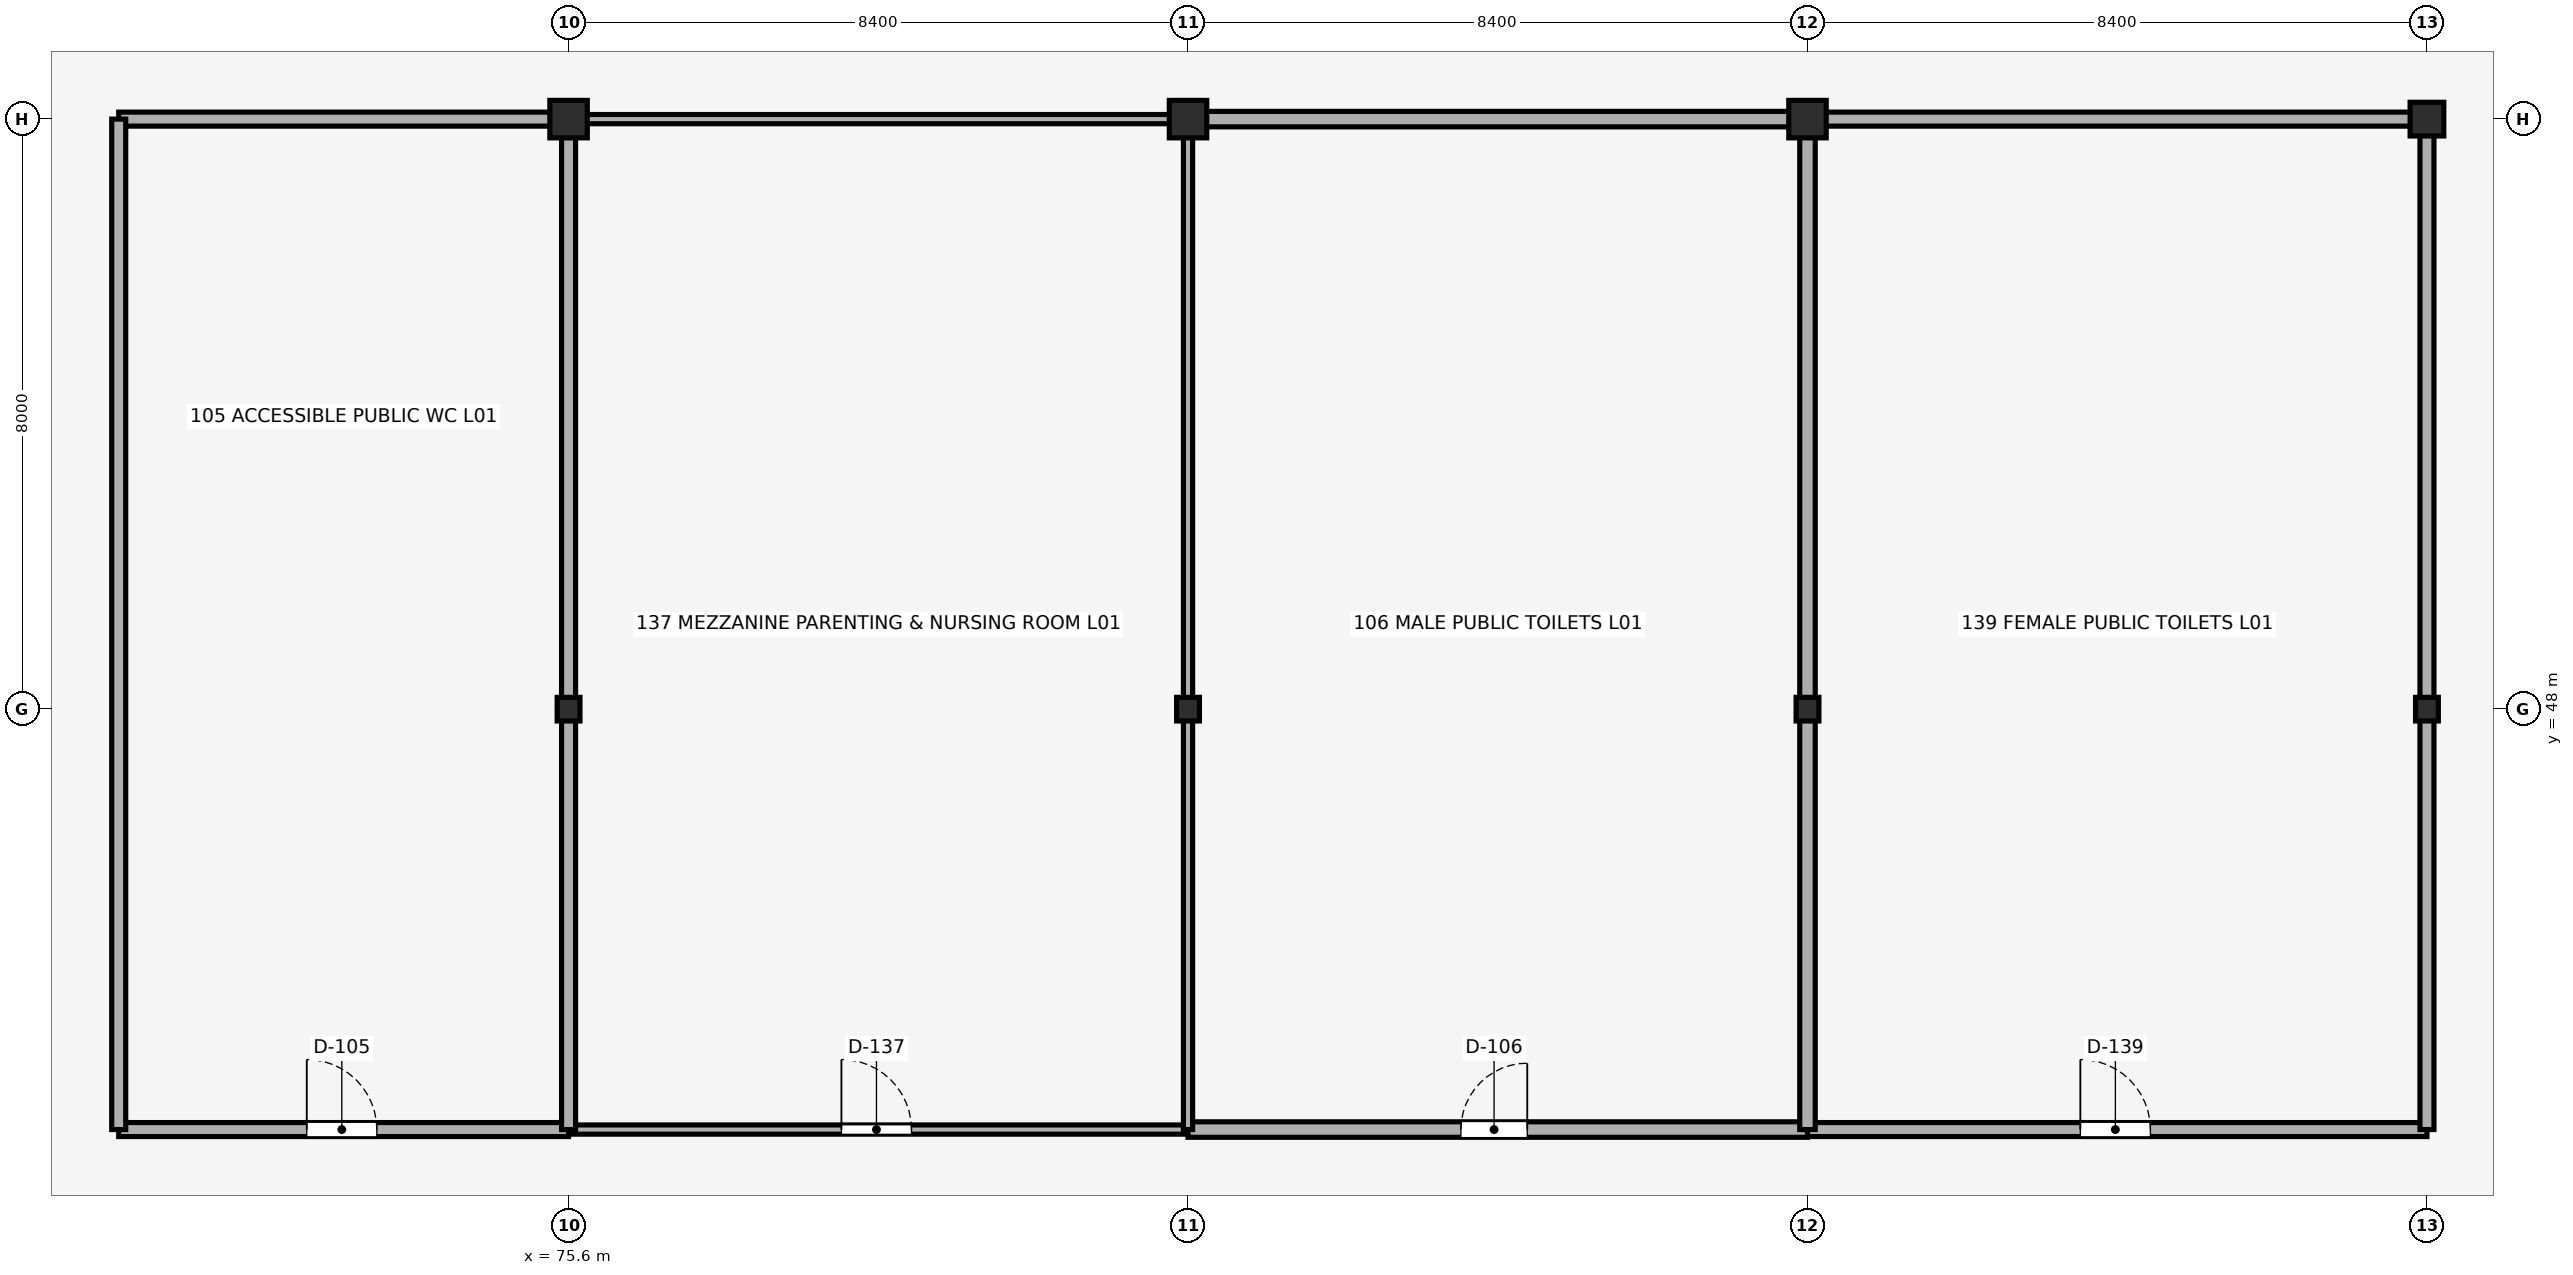
"""IFC4 building model, lengths in metres.
Left out: names, types, materials, properties, quantities, classifications, styles, units other than length and angle.
Written with IfcOpenShell. Run it as: python <this file> out.ifc"""

import sys

from ifc_helpers import new_model, si_unit, direction, frame, frame_2d, origin, origin_2d, place, context, subcontext, project, spatial, rectangle, hollow_circle, i_section, extrude, element, fill, save


model = new_model("IFC4")
c1 = context("Model", 3, precision=1e-05, world=origin(), true_north=direction((0.0, 1.0)))
c2 = subcontext(c1, "Body", "Model", "MODEL_VIEW")
j1 = project(units=[si_unit("LENGTHUNIT", "METRE"), si_unit("PLANEANGLEUNIT", "RADIAN")], contexts=[c1])
p1 = place(None, origin())
s1 = spatial("IfcSite", under=j1, at=p1, CompositionType="ELEMENT")
p2 = place(p1, origin())
s2 = spatial("IfcBuilding", under=s1, at=p2, CompositionType="ELEMENT")
p3 = place(p2, frame((0.0, 0.0, 5.44)))
s3 = spatial("IfcBuildingStorey", under=s2, at=p3, CompositionType="ELEMENT", Elevation=5.44)
p4 = place(p3, frame((75.6, 48.0, 0.0), z_axis=(0.0, 0.0, 1.0), x_axis=(1.0, 0.0, 0.0)))
e1 = element("IfcColumn", 1, at=p4, inside=s3, PredefinedType="COLUMN", context=c2, shape_type="SweptSolid", body=[
    extrude(i_section(OverallWidth=0.309, OverallDepth=0.321, WebThickness=0.014, FlangeThickness=0.022, FilletRadius=0.015, at=origin_2d()), origin(), (0.0, 0.0, 1.0), 3.8),
])
p5 = place(p3, frame((75.6, 56.0, 0.0), z_axis=(0.0, 0.0, 1.0), x_axis=(1.0, 0.0, 0.0)))
e2 = element("IfcColumn", 2, at=p5, inside=s3, PredefinedType="COLUMN", context=c2, shape_type="SweptSolid", body=[
    extrude(hollow_circle(Radius=0.229, WallThickness=0.016, at=origin_2d()), origin(), (0.0, 0.0, 1.0), 11.288),
])
p6 = place(p3, frame((84.0, 48.0, 0.0), z_axis=(0.0, 0.0, 1.0), x_axis=(1.0, 0.0, 0.0)))
e3 = element("IfcColumn", 3, at=p6, inside=s3, PredefinedType="COLUMN", context=c2, shape_type="SweptSolid", body=[
    extrude(i_section(OverallWidth=0.309, OverallDepth=0.321, WebThickness=0.014, FlangeThickness=0.022, FilletRadius=0.015, at=origin_2d()), origin(), (0.0, 0.0, 1.0), 3.8),
])
p7 = place(p3, frame((84.0, 56.0, 0.0), z_axis=(0.0, 0.0, 1.0), x_axis=(1.0, 0.0, 0.0)))
e4 = element("IfcColumn", 4, at=p7, inside=s3, PredefinedType="COLUMN", context=c2, shape_type="SweptSolid", body=[
    extrude(hollow_circle(Radius=0.229, WallThickness=0.016, at=origin_2d()), origin(), (0.0, 0.0, 1.0), 11.288),
])
p8 = place(p3, frame((92.4, 48.0, 0.0), z_axis=(0.0, 0.0, 1.0), x_axis=(1.0, 0.0, 0.0)))
e5 = element("IfcColumn", 5, at=p8, inside=s3, PredefinedType="COLUMN", context=c2, shape_type="SweptSolid", body=[
    extrude(i_section(OverallWidth=0.309, OverallDepth=0.321, WebThickness=0.014, FlangeThickness=0.022, FilletRadius=0.015, at=origin_2d()), origin(), (0.0, 0.0, 1.0), 3.8),
])
p9 = place(p3, frame((92.4, 56.0, 0.0), z_axis=(0.0, 0.0, 1.0), x_axis=(1.0, 0.0, 0.0)))
e6 = element("IfcColumn", 6, at=p9, inside=s3, PredefinedType="COLUMN", context=c2, shape_type="SweptSolid", body=[
    extrude(hollow_circle(Radius=0.229, WallThickness=0.016, at=origin_2d()), origin(), (0.0, 0.0, 1.0), 12.952),
])
p10 = place(p3, frame((100.8, 48.0, 0.0), z_axis=(0.0, 0.0, 1.0), x_axis=(1.0, 0.0, 0.0)))
e7 = element("IfcColumn", 7, at=p10, inside=s3, PredefinedType="COLUMN", context=c2, shape_type="SweptSolid", body=[
    extrude(i_section(OverallWidth=0.309, OverallDepth=0.321, WebThickness=0.014, FlangeThickness=0.022, FilletRadius=0.015, at=origin_2d()), origin(), (0.0, 0.0, 1.0), 3.8),
])
p11 = place(p3, frame((100.8, 56.0, 0.0), z_axis=(0.0, 0.0, 1.0), x_axis=(1.0, 0.0, 0.0)))
e8 = element("IfcColumn", 8, at=p11, inside=s3, PredefinedType="COLUMN", context=c2, shape_type="SweptSolid", body=[
    extrude(hollow_circle(Radius=0.229, WallThickness=0.016, at=origin_2d()), origin(), (0.0, 0.0, 1.0), 16.31),
])
for number, where, z_axis, x_axis in (
    (9, (75.6, 56.0, 11.338), (0.0, -0.105, 0.994), (1.0, 0.0, 0.0)),
    (10, (84.0, 56.0, 11.338), (0.0, -0.105, 0.994), (1.0, 0.0, 0.0)),
):
    element("IfcColumn", number, at=place(p3, frame(where, z_axis=z_axis, x_axis=x_axis)), inside=s3, PredefinedType="COLUMN", context=c2, shape_type="SweptSolid", body=[
        extrude(hollow_circle(Radius=0.254, WallThickness=0.02, at=origin_2d()), origin(), (0.0, 0.0, 1.0), 2.846),
    ])
p12 = place(p3, frame((92.4, 56.0, 13.002), z_axis=(0.0, -0.105430502232, 0.994426673616), x_axis=(1.0, 0.0, 0.0)))
e11 = element("IfcColumn", 11, at=p12, inside=s3, PredefinedType="COLUMN", context=c2, shape_type="SweptSolid", body=[
    extrude(hollow_circle(Radius=0.254, WallThickness=0.02, at=origin_2d()), origin(), (0.0, 0.0, 1.0), 2.846),
])
p13 = place(p3, frame((69.5, 42.3, 0.0), z_axis=(0.0, 0.0, 1.0), x_axis=(1.0, 0.0, 0.0)))
e12 = element("IfcWall", 12, at=p13, inside=s3, PredefinedType="PLUMBINGWALL", context=c2, shape_type="SweptSolid", body=[
    extrude(rectangle(XDim=6.1, YDim=0.19, at=frame_2d((3.05, 0.0))), origin(), (0.0, 0.0, 1.0), 3.8),
])
p14 = place(p13, frame((2.55, 0.0, 0.0), z_axis=(0.0, 0.0, 1.0), x_axis=(1.0, 0.0, 0.0)))
e13 = element("IfcOpeningElement", 13, at=p14, cuts=e12, PredefinedType="OPENING", context=c2, shape_type="SweptSolid", body=[
    extrude(rectangle(XDim=0.95, YDim=2.15, at=frame_2d((0.475, 1.075))), frame((0.0, 0.105, 0.0), z_axis=(0.0, -1.0, 0.0), x_axis=(1.0, 0.0, 0.0)), (0.0, 0.0, 1.0), 0.21),
])
p15 = place(p3, frame((75.6, 42.3, 0.0), z_axis=(0.0, 0.0, 1.0), x_axis=(1.0, 0.0, 0.0)))
e14 = element("IfcWall", 14, at=p15, inside=s3, PredefinedType="PARTITIONING", context=c2, shape_type="SweptSolid", body=[
    extrude(rectangle(XDim=8.4, YDim=0.125, at=frame_2d((4.2, 0.0))), origin(), (0.0, 0.0, 1.0), 3.8),
])
p16 = place(p15, frame((3.7, 0.0, 0.0), z_axis=(0.0, 0.0, 1.0), x_axis=(1.0, 0.0, 0.0)))
e15 = element("IfcOpeningElement", 15, at=p16, cuts=e14, PredefinedType="OPENING", context=c2, shape_type="SweptSolid", body=[
    extrude(rectangle(XDim=0.95, YDim=2.15, at=frame_2d((0.475, 1.075))), frame((0.0, 0.073, 0.0), z_axis=(0.0, -1.0, 0.0), x_axis=(1.0, 0.0, 0.0)), (0.0, 0.0, 1.0), 0.145),
])
p17 = place(p3, frame((84.0, 42.3, 0.0), z_axis=(0.0, 0.0, 1.0), x_axis=(1.0, 0.0, 0.0)))
e16 = element("IfcWall", 16, at=p17, inside=s3, PredefinedType="PLUMBINGWALL", context=c2, shape_type="SweptSolid", body=[
    extrude(rectangle(XDim=8.4, YDim=0.21, at=frame_2d((4.2, 0.0))), origin(), (0.0, 0.0, 1.0), 3.8),
])
p18 = place(p17, frame((3.7, 0.0, 0.0), z_axis=(0.0, 0.0, 1.0), x_axis=(1.0, 0.0, 0.0)))
e17 = element("IfcOpeningElement", 17, at=p18, cuts=e16, PredefinedType="OPENING", context=c2, shape_type="SweptSolid", body=[
    extrude(rectangle(XDim=0.9, YDim=2.15, at=frame_2d((0.45, 1.075))), frame((0.0, 0.115, 0.0), z_axis=(0.0, -1.0, 0.0), x_axis=(1.0, 0.0, 0.0)), (0.0, 0.0, 1.0), 0.23),
])
p19 = place(p3, frame((92.4, 42.3, 0.0), z_axis=(0.0, 0.0, 1.0), x_axis=(1.0, 0.0, 0.0)))
e18 = element("IfcWall", 18, at=p19, inside=s3, PredefinedType="PLUMBINGWALL", context=c2, shape_type="SweptSolid", body=[
    extrude(rectangle(XDim=8.4, YDim=0.19, at=frame_2d((4.2, 0.0))), origin(), (0.0, 0.0, 1.0), 3.8),
])
p20 = place(p19, frame((3.7, 0.0, 0.0), z_axis=(0.0, 0.0, 1.0), x_axis=(1.0, 0.0, 0.0)))
e19 = element("IfcOpeningElement", 19, at=p20, cuts=e18, PredefinedType="OPENING", context=c2, shape_type="SweptSolid", body=[
    extrude(rectangle(XDim=0.95, YDim=2.15, at=frame_2d((0.475, 1.075))), frame((0.0, 0.105, 0.0), z_axis=(0.0, -1.0, 0.0), x_axis=(1.0, 0.0, 0.0)), (0.0, 0.0, 1.0), 0.21),
])
p21 = place(p3, frame((69.5, 56.0, 0.0), z_axis=(0.0, 0.0, 1.0), x_axis=(1.0, 0.0, 0.0)))
e20 = element("IfcWall", 20, at=p21, inside=s3, PredefinedType="PLUMBINGWALL", context=c2, shape_type="SweptSolid", body=[
    extrude(rectangle(XDim=5.882, YDim=0.19, at=frame_2d((2.941, 0.0))), origin(), (0.0, 0.0, 1.0), 3.8),
])
p22 = place(p3, frame((69.5, 42.3, 0.0), z_axis=(0.0, 0.0, 1.0), x_axis=(0.0, 1.0, 0.0)))
e21 = element("IfcWall", 21, at=p22, inside=s3, PredefinedType="PLUMBINGWALL", context=c2, shape_type="SweptSolid", body=[
    extrude(rectangle(XDim=13.7, YDim=0.19, at=frame_2d((6.85, 0.0))), origin(), (0.0, 0.0, 1.0), 3.8),
])
p23 = place(p3, frame((75.6, 42.3, 0.0), z_axis=(0.0, 0.0, 1.0), x_axis=(0.0, 1.0, 0.0)))
e22 = element("IfcWall", 22, at=p23, inside=s3, PredefinedType="PLUMBINGWALL", context=c2, shape_type="SweptSolid", body=[
    extrude(rectangle(XDim=5.55, YDim=0.19, at=frame_2d((2.775, 0.0))), origin(), (0.0, 0.0, 1.0), 3.337),
])
p24 = place(p3, frame((75.6, 48.15, 0.0), z_axis=(0.0, 0.0, 1.0), x_axis=(0.0, 1.0, 0.0)))
e23 = element("IfcWall", 23, at=p24, inside=s3, PredefinedType="PLUMBINGWALL", context=c2, shape_type="SweptSolid", body=[
    extrude(rectangle(XDim=7.631, YDim=0.19, at=frame_2d((3.815, 0.0))), origin(), (0.0, 0.0, 1.0), 3.337),
])
p25 = place(p3, frame((75.819, 56.0, 0.0), z_axis=(0.0, 0.0, 1.0), x_axis=(1.0, 0.0, 0.0)))
e24 = element("IfcWall", 24, at=p25, inside=s3, PredefinedType="PARTITIONING", context=c2, shape_type="SweptSolid", body=[
    extrude(rectangle(XDim=7.963, YDim=0.125, at=frame_2d((3.981, 0.0))), origin(), (0.0, 0.0, 1.0), 3.8),
])
p26 = place(p3, frame((84.0, 42.3, 0.0), z_axis=(0.0, 0.0, 1.0), x_axis=(0.0, 1.0, 0.0)))
e25 = element("IfcWall", 25, at=p26, inside=s3, PredefinedType="PARTITIONING", context=c2, shape_type="SweptSolid", body=[
    extrude(rectangle(XDim=5.55, YDim=0.125, at=frame_2d((2.775, 0.0))), origin(), (0.0, 0.0, 1.0), 3.337),
])
p27 = place(p3, frame((84.0, 48.15, 0.0), z_axis=(0.0, 0.0, 1.0), x_axis=(0.0, 1.0, 0.0)))
e26 = element("IfcWall", 26, at=p27, inside=s3, PredefinedType="PARTITIONING", context=c2, shape_type="SweptSolid", body=[
    extrude(rectangle(XDim=7.631, YDim=0.125, at=frame_2d((3.815, 0.0))), origin(), (0.0, 0.0, 1.0), 3.337),
])
p28 = place(p3, frame((84.219, 56.0, 0.0), z_axis=(0.0, 0.0, 1.0), x_axis=(1.0, 0.0, 0.0)))
e27 = element("IfcWall", 27, at=p28, inside=s3, PredefinedType="PLUMBINGWALL", context=c2, shape_type="SweptSolid", body=[
    extrude(rectangle(XDim=7.963, YDim=0.21, at=frame_2d((3.981, 0.0))), origin(), (0.0, 0.0, 1.0), 3.8),
])
p29 = place(p3, frame((92.4, 42.3, 0.0), z_axis=(0.0, 0.0, 1.0), x_axis=(0.0, 1.0, 0.0)))
e28 = element("IfcWall", 28, at=p29, inside=s3, PredefinedType="PLUMBINGWALL", context=c2, shape_type="SweptSolid", body=[
    extrude(rectangle(XDim=5.55, YDim=0.21, at=frame_2d((2.775, 0.0))), origin(), (0.0, 0.0, 1.0), 3.337),
])
p30 = place(p3, frame((92.4, 48.15, 0.0), z_axis=(0.0, 0.0, 1.0), x_axis=(0.0, 1.0, 0.0)))
e29 = element("IfcWall", 29, at=p30, inside=s3, PredefinedType="PLUMBINGWALL", context=c2, shape_type="SweptSolid", body=[
    extrude(rectangle(XDim=7.631, YDim=0.21, at=frame_2d((3.815, 0.0))), origin(), (0.0, 0.0, 1.0), 3.337),
])
p31 = place(p3, frame((92.618, 56.0, 0.0), z_axis=(0.0, 0.0, 1.0), x_axis=(1.0, 0.0, 0.0)))
e30 = element("IfcWall", 30, at=p31, inside=s3, PredefinedType="PLUMBINGWALL", context=c2, shape_type="SweptSolid", body=[
    extrude(rectangle(XDim=7.963, YDim=0.19, at=frame_2d((3.981, 0.0))), origin(), (0.0, 0.0, 1.0), 3.8),
])
p32 = place(p3, frame((100.8, 42.3, 0.0), z_axis=(0.0, 0.0, 1.0), x_axis=(0.0, 1.0, 0.0)))
e31 = element("IfcWall", 31, at=p32, inside=s3, PredefinedType="PLUMBINGWALL", context=c2, shape_type="SweptSolid", body=[
    extrude(rectangle(XDim=5.55, YDim=0.19, at=frame_2d((2.775, 0.0))), origin(), (0.0, 0.0, 1.0), 3.337),
])
p33 = place(p3, frame((100.8, 48.15, 0.0), z_axis=(0.0, 0.0, 1.0), x_axis=(0.0, 1.0, 0.0)))
e32 = element("IfcWall", 32, at=p33, inside=s3, PredefinedType="PLUMBINGWALL", context=c2, shape_type="SweptSolid", body=[
    extrude(rectangle(XDim=7.631, YDim=0.19, at=frame_2d((3.815, 0.0))), origin(), (0.0, 0.0, 1.0), 3.337),
])
p34 = place(p14, origin())
e33 = element("IfcDoor", 33, at=p34, inside=s3, OperationType="SINGLE_SWING_LEFT", PredefinedType="DOOR", context=c2, shape_type="SweptSolid", body=[
    extrude(rectangle(XDim=0.95, YDim=2.15, at=frame_2d((0.475, 1.075))), frame((0.0, 0.025, 0.0), z_axis=(0.0, -1.0, 0.0), x_axis=(1.0, 0.0, 0.0)), (0.0, 0.0, 1.0), 0.05),
])
fill(e13, e33)
p35 = place(p16, origin())
e34 = element("IfcDoor", 34, at=p35, inside=s3, OperationType="SINGLE_SWING_LEFT", PredefinedType="DOOR", context=c2, shape_type="SweptSolid", body=[
    extrude(rectangle(XDim=0.95, YDim=2.15, at=frame_2d((0.475, 1.075))), frame((0.0, 0.025, 0.0), z_axis=(0.0, -1.0, 0.0), x_axis=(1.0, 0.0, 0.0)), (0.0, 0.0, 1.0), 0.05),
])
fill(e15, e34)
p36 = place(p18, origin())
e35 = element("IfcDoor", 35, at=p36, inside=s3, OperationType="SINGLE_SWING_RIGHT", PredefinedType="DOOR", context=c2, shape_type="SweptSolid", body=[
    extrude(rectangle(XDim=0.9, YDim=2.15, at=frame_2d((0.45, 1.075))), frame((0.0, 0.025, 0.0), z_axis=(0.0, -1.0, 0.0), x_axis=(1.0, 0.0, 0.0)), (0.0, 0.0, 1.0), 0.05),
])
fill(e17, e35)
p37 = place(p20, origin())
e36 = element("IfcDoor", 36, at=p37, inside=s3, OperationType="SINGLE_SWING_LEFT", PredefinedType="DOOR", context=c2, shape_type="SweptSolid", body=[
    extrude(rectangle(XDim=0.95, YDim=2.15, at=frame_2d((0.475, 1.075))), frame((0.0, 0.025, 0.0), z_axis=(0.0, -1.0, 0.0), x_axis=(1.0, 0.0, 0.0)), (0.0, 0.0, 1.0), 0.05),
])
fill(e19, e36)
save(model, sys.argv[1])
